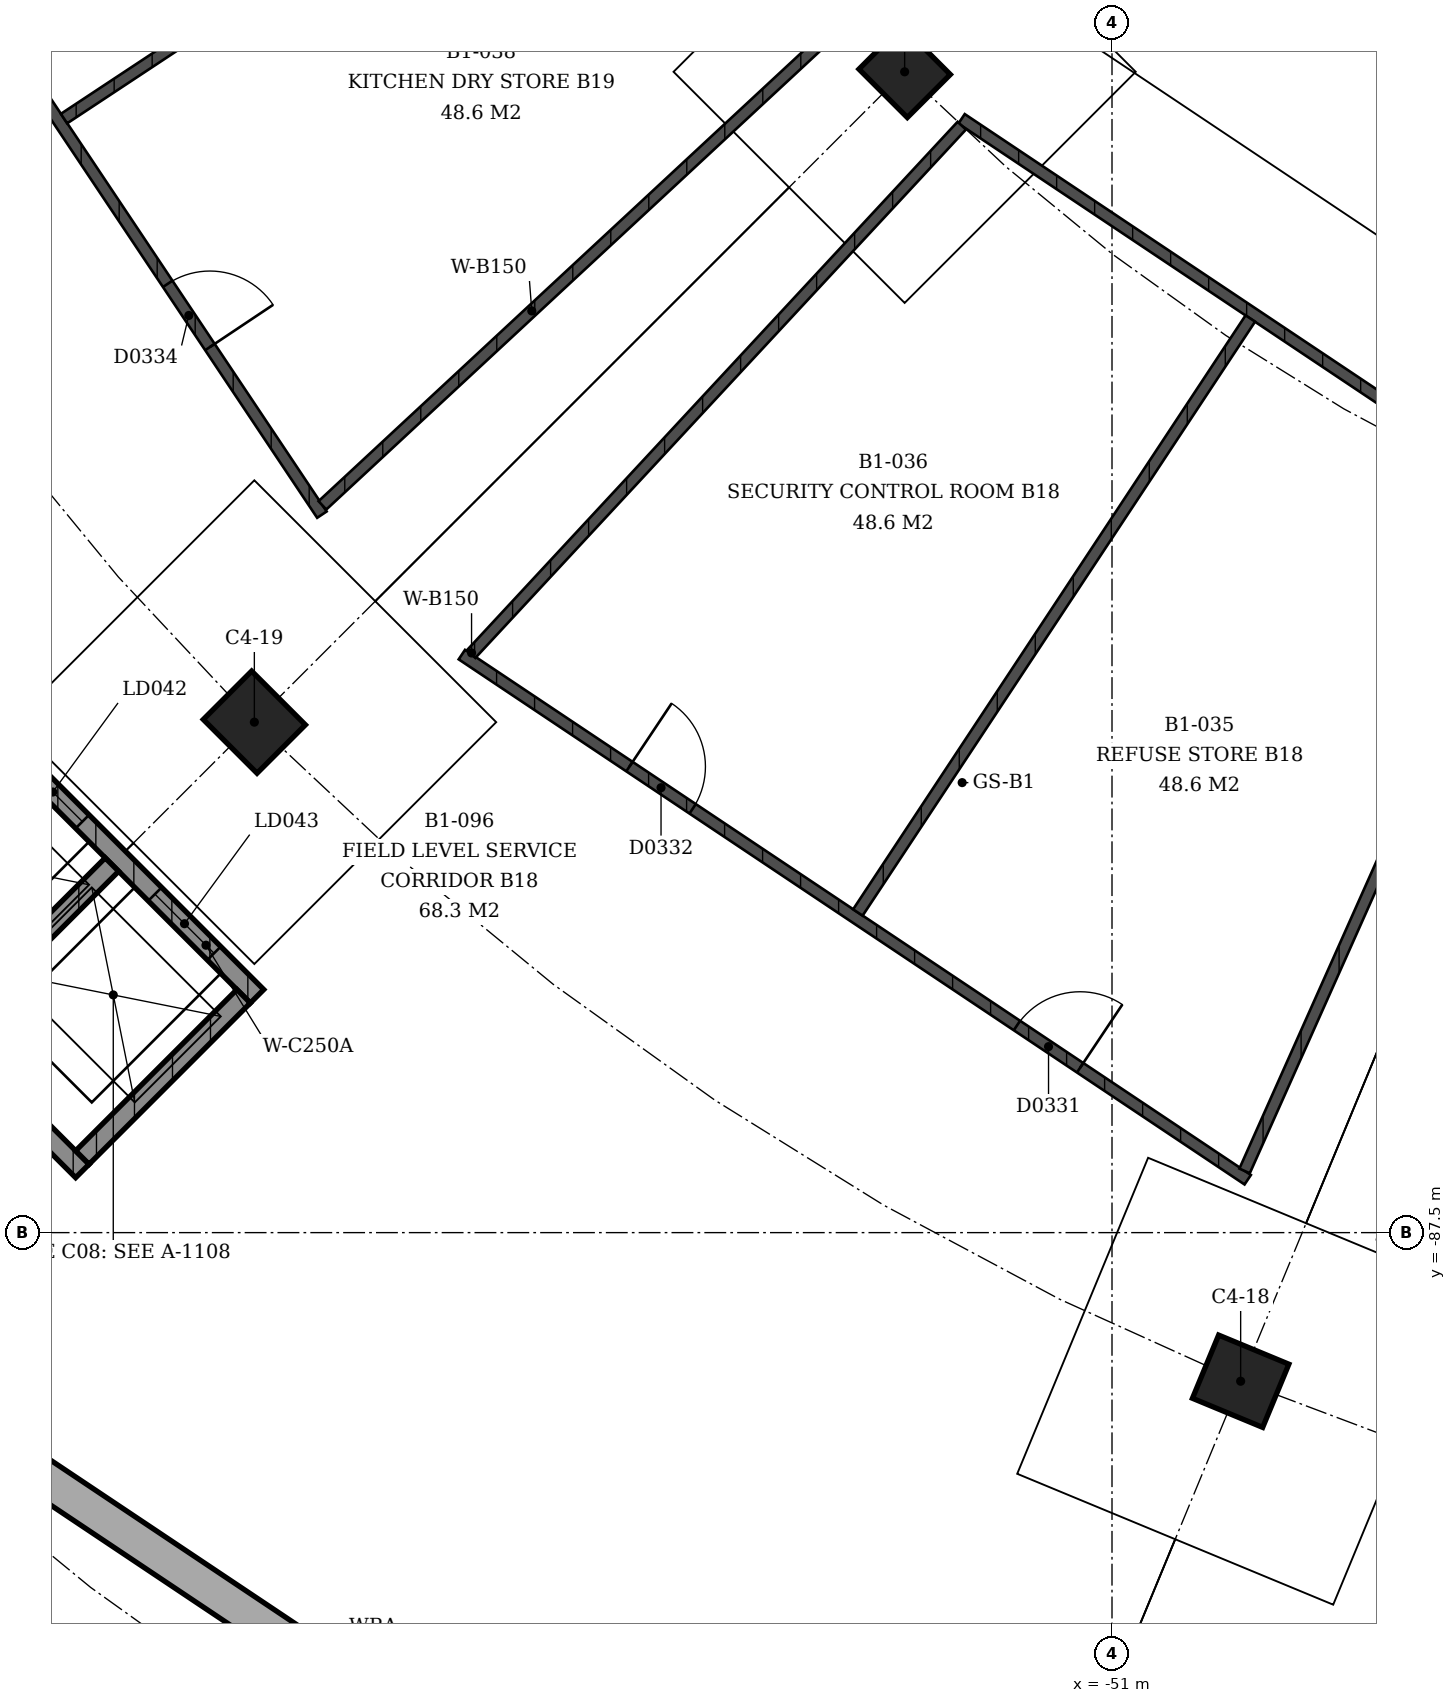
"""IFC4 building model, lengths in metres.
Left out: names, types, materials, properties, quantities, classifications, styles, units other than length and angle.
Written with IfcOpenShell. Run it as: python <this file> out.ifc"""

import sys

from ifc_helpers import new_model, si_unit, direction, frame, frame_2d, origin, origin_2d, place, context, subcontext, project, spatial, polyline, rectangle, outline, extrude, element, fill, save


model = new_model("IFC4")
c1 = context("Model", 3, precision=1e-05, world=origin(), true_north=direction((0.0, 1.0)))
c2 = subcontext(c1, "Body", "Model", "MODEL_VIEW")
j1 = project(units=[si_unit("LENGTHUNIT", "METRE"), si_unit("PLANEANGLEUNIT", "RADIAN")], contexts=[c1])
p1 = place(None, origin())
s1 = spatial("IfcSite", under=j1, at=p1, CompositionType="ELEMENT")
p2 = place(p1, origin())
s2 = spatial("IfcBuilding", under=s1, at=p2, CompositionType="ELEMENT")
p3 = place(p2, frame((0.0, 0.0, -4.5)))
s3 = spatial("IfcBuildingStorey", under=s2, at=p3, CompositionType="ELEMENT", Elevation=-4.5)
p4 = place(p3, frame((-49.307, -89.455, 0.0), z_axis=(0.0, 0.0, 1.0), x_axis=(0.923879532511, -0.382683432365, 0.0)))
e1 = element("IfcColumn", 1, at=p4, inside=s3, PredefinedType="COLUMN", context=c2, shape_type="SweptSolid", body=[
    extrude(rectangle(XDim=1.0, YDim=0.9, at=origin_2d()), origin(), (0.0, 0.0, 1.0), 4.5),
])
p5 = place(p3, frame((-53.728, -72.228, 0.0), z_axis=(0.0, 0.0, 1.0), x_axis=(0.707106781187, -0.707106781187, 0.0)))
e2 = element("IfcColumn", 2, at=p5, inside=s3, PredefinedType="COLUMN", context=c2, shape_type="SweptSolid", body=[
    extrude(rectangle(XDim=0.9, YDim=0.8, at=origin_2d()), origin(), (0.0, 0.0, 1.0), 4.5),
])
p6 = place(p3, frame((-62.284, -80.784, 0.0), z_axis=(0.0, 0.0, 1.0), x_axis=(0.707106781187, -0.707106781187, 0.0)))
e3 = element("IfcColumn", 3, at=p6, inside=s3, PredefinedType="COLUMN", context=c2, shape_type="SweptSolid", body=[
    extrude(rectangle(XDim=1.0, YDim=0.9, at=origin_2d()), origin(), (0.0, 0.0, 1.0), 4.5),
])
p7 = place(p3, frame((0.0, 0.0, -0.4)))
e4 = element("IfcWall", 4, at=p7, inside=s3, PredefinedType="SOLIDWALL", context=c2, shape_type="SweptSolid", body=[
    extrude(outline(polyline([(-68.712, -87.99), (-69.066, -88.344), (-53.696, -98.613), (-53.505, -98.151), (-68.712, -87.99)])), origin(), (0.0, 0.0, 1.0), 3.19),
])
p8 = place(p3, frame((-65.891, -80.749, -1.2), z_axis=(0.0, 0.0, 1.0), x_axis=(0.707106781187, -0.707106781187, 0.0)))
e5 = element("IfcWall", 5, at=p8, inside=s3, PredefinedType="SHEAR", context=c2, shape_type="SweptSolid", body=[
    extrude(rectangle(XDim=5.15, YDim=0.25, at=frame_2d((2.575, 0.0))), origin(), (0.0, 0.0, 1.0), 5.29),
])
p9 = place(p8, frame((0.8, 0.0, 1.2)))
e6 = element("IfcOpeningElement", 6, at=p9, cuts=e5, PredefinedType="OPENING", context=c2, shape_type="SweptSolid", body=[
    extrude(rectangle(XDim=1.1, YDim=2.1, at=frame_2d((0.55, 1.05))), frame((0.0, 0.125, 0.0), z_axis=(0.0, -1.0, 0.0), x_axis=(1.0, 0.0, 0.0)), (0.0, 0.0, 1.0), 0.25),
])
p10 = place(p8, frame((3.25, 0.0, 1.2)))
e7 = element("IfcOpeningElement", 7, at=p10, cuts=e5, PredefinedType="OPENING", context=c2, shape_type="SweptSolid", body=[
    extrude(rectangle(XDim=1.1, YDim=2.1, at=frame_2d((0.55, 1.05))), frame((0.0, 0.125, 0.0), z_axis=(0.0, -1.0, 0.0), x_axis=(1.0, 0.0, 0.0)), (0.0, 0.0, 1.0), 0.25),
])
p11 = place(p3, frame((-68.189, -83.047, -1.2), z_axis=(0.0, 0.0, 1.0), x_axis=(0.707106781187, -0.707106781187, 0.0)))
e8 = element("IfcWall", 8, at=p11, inside=s3, PredefinedType="SHEAR", context=c2, shape_type="SweptSolid", body=[
    extrude(rectangle(XDim=5.15, YDim=0.25, at=frame_2d((2.575, 0.0))), origin(), (0.0, 0.0, 1.0), 5.29),
])
p12 = place(p3, frame((-62.426, -84.391, -1.2), z_axis=(0.0, 0.0, 1.0), x_axis=(-0.707147472125, -0.707066087907, 0.0)))
e9 = element("IfcWall", 9, at=p12, inside=s3, PredefinedType="SHEAR", context=c2, shape_type="SweptSolid", body=[
    extrude(rectangle(XDim=3.0, YDim=0.25, at=frame_2d((1.5, 0.0))), origin(), (0.0, 0.0, 1.0), 5.29),
])
p13 = place(p3, frame((-64.158, -82.658, -1.2), z_axis=(0.0, 0.0, 1.0), x_axis=(-0.707106781187, -0.707106781187, 0.0)))
e10 = element("IfcWall", 10, at=p13, inside=s3, PredefinedType="SHEAR", context=c2, shape_type="SweptSolid", body=[
    extrude(rectangle(XDim=3.0, YDim=0.25, at=frame_2d((1.5, 0.0))), origin(), (0.0, 0.0, 1.0), 5.29),
])
p14 = place(p3, frame((-45.097, -78.114, 0.0), z_axis=(0.0, 0.0, 1.0), x_axis=(-0.831463470141, 0.555579425305, 0.0)))
e11 = element("IfcWall", 11, at=p14, inside=s3, PredefinedType="SOLIDWALL", context=c2, shape_type="SweptSolid", body=[
    extrude(rectangle(XDim=9.48, YDim=0.15, at=frame_2d((4.74, 0.0))), origin(), (0.0, 0.0, 1.0), 3.0),
])
p15 = place(p3, frame((-49.214, -86.804, 0.0), z_axis=(0.0, 0.0, 1.0), x_axis=(-0.831475975747, 0.555560709334, 0.0)))
e12 = element("IfcWall", 12, at=p15, inside=s3, PredefinedType="SOLIDWALL", context=c2, shape_type="SweptSolid", body=[
    extrude(rectangle(XDim=12.436, YDim=0.15, at=frame_2d((6.218, 0.0))), origin(), (0.0, 0.0, 1.0), 3.0),
])
p16 = place(p15, frame((2.652, 0.0, 0.0)))
e13 = element("IfcOpeningElement", 13, at=p16, cuts=e12, PredefinedType="OPENING", context=c2, shape_type="SweptSolid", body=[
    extrude(rectangle(XDim=1.0, YDim=2.1, at=frame_2d((0.5, 1.05))), frame((0.0, 0.075, 0.0), z_axis=(0.0, -1.0, 0.0), x_axis=(1.0, 0.0, 0.0)), (0.0, 0.0, 1.0), 0.15),
])
p17 = place(p15, frame((8.784, 0.0, 0.0)))
e14 = element("IfcOpeningElement", 14, at=p17, cuts=e12, PredefinedType="OPENING", context=c2, shape_type="SweptSolid", body=[
    extrude(rectangle(XDim=1.0, YDim=2.1, at=frame_2d((0.5, 1.05))), frame((0.0, 0.075, 0.0), z_axis=(0.0, -1.0, 0.0), x_axis=(1.0, 0.0, 0.0)), (0.0, 0.0, 1.0), 0.15),
])
p18 = place(p3, frame((-45.383, -78.01, 0.0), z_axis=(0.0, 0.0, 1.0), x_axis=(-0.407503936666, -0.913203450279, 0.0)))
e15 = element("IfcWall", 15, at=p18, inside=s3, PredefinedType="SOLIDWALL", context=c2, shape_type="SweptSolid", body=[
    extrude(rectangle(XDim=9.502, YDim=0.15, at=frame_2d((4.751, 0.0))), origin(), (0.0, 0.0, 1.0), 3.0),
])
p19 = place(p3, frame((-49.18, -75.474, 0.0), z_axis=(0.0, 0.0, 1.0), x_axis=(-0.551278973714, -0.834320977287, 0.0)))
e16 = element("IfcWall", 16, at=p19, inside=s3, PredefinedType="SOLIDWALL", context=c2, shape_type="SweptSolid", body=[
    extrude(rectangle(XDim=9.366, YDim=0.15, at=frame_2d((4.683, 0.0))), origin(), (0.0, 0.0, 1.0), 3.0),
])
p20 = place(p3, frame((-52.977, -72.937, 0.0), z_axis=(0.0, 0.0, 1.0), x_axis=(-0.680436292727, -0.732807240371, 0.0)))
e17 = element("IfcWall", 17, at=p20, inside=s3, PredefinedType="SOLIDWALL", context=c2, shape_type="SweptSolid", body=[
    extrude(rectangle(XDim=9.487, YDim=0.15, at=frame_2d((4.743, 0.0))), origin(), (0.0, 0.0, 1.0), 3.0),
])
p21 = place(p3, frame((-68.304, -67.714, 0.0), z_axis=(0.0, 0.0, 1.0), x_axis=(0.555560709334, -0.831475975747, 0.0)))
e18 = element("IfcWall", 18, at=p21, inside=s3, PredefinedType="SOLIDWALL", context=c2, shape_type="SweptSolid", body=[
    extrude(rectangle(XDim=12.436, YDim=0.15, at=frame_2d((6.218, 0.0))), origin(), (0.0, 0.0, 1.0), 3.0),
])
p22 = place(p21, frame((2.652, 0.0, 0.0)))
e19 = element("IfcOpeningElement", 19, at=p22, cuts=e18, PredefinedType="OPENING", context=c2, shape_type="SweptSolid", body=[
    extrude(rectangle(XDim=1.0, YDim=2.1, at=frame_2d((0.5, 1.05))), frame((0.0, 0.075, 0.0), z_axis=(0.0, -1.0, 0.0), x_axis=(1.0, 0.0, 0.0)), (0.0, 0.0, 1.0), 0.15),
])
p23 = place(p21, frame((8.784, 0.0, 0.0)))
e20 = element("IfcOpeningElement", 20, at=p23, cuts=e18, PredefinedType="OPENING", context=c2, shape_type="SweptSolid", body=[
    extrude(rectangle(XDim=1.0, YDim=2.1, at=frame_2d((0.5, 1.05))), frame((0.0, 0.075, 0.0), z_axis=(0.0, -1.0, 0.0), x_axis=(1.0, 0.0, 0.0)), (0.0, 0.0, 1.0), 0.15),
])
p24 = place(p3, frame((-56.974, -67.68, 0.0), z_axis=(0.0, 0.0, 1.0), x_axis=(-0.834320977287, -0.551278973714, 0.0)))
e21 = element("IfcWall", 21, at=p24, inside=s3, PredefinedType="SOLIDWALL", context=c2, shape_type="SweptSolid", body=[
    extrude(rectangle(XDim=9.366, YDim=0.15, at=frame_2d((4.683, 0.0))), origin(), (0.0, 0.0, 1.0), 3.0),
])
p25 = place(p3, frame((-54.437, -71.477, 0.0), z_axis=(0.0, 0.0, 1.0), x_axis=(-0.732807240371, -0.680436292727, 0.0)))
e22 = element("IfcWall", 22, at=p25, inside=s3, PredefinedType="SOLIDWALL", context=c2, shape_type="SweptSolid", body=[
    extrude(rectangle(XDim=9.487, YDim=0.15, at=frame_2d((4.743, 0.0))), origin(), (0.0, 0.0, 1.0), 3.0),
])
p26 = place(p9, origin())
e23 = element("IfcDoor", 23, at=p26, inside=s3, OperationType="SLIDING_TO_LEFT", PredefinedType="DOOR", context=c2, shape_type="SweptSolid", body=[
    extrude(rectangle(XDim=1.1, YDim=2.1, at=frame_2d((0.55, 1.05))), frame((0.0, 0.025, 0.0), z_axis=(0.0, -1.0, 0.0), x_axis=(1.0, 0.0, 0.0)), (0.0, 0.0, 1.0), 0.05),
])
fill(e6, e23)
p27 = place(p10, origin())
e24 = element("IfcDoor", 24, at=p27, inside=s3, OperationType="SLIDING_TO_LEFT", PredefinedType="DOOR", context=c2, shape_type="SweptSolid", body=[
    extrude(rectangle(XDim=1.1, YDim=2.1, at=frame_2d((0.55, 1.05))), frame((0.0, 0.025, 0.0), z_axis=(0.0, -1.0, 0.0), x_axis=(1.0, 0.0, 0.0)), (0.0, 0.0, 1.0), 0.05),
])
fill(e7, e24)
p28 = place(p16, origin())
e25 = element("IfcDoor", 25, at=p28, inside=s3, OperationType="SINGLE_SWING_LEFT", PredefinedType="DOOR", context=c2, shape_type="SweptSolid", body=[
    extrude(rectangle(XDim=1.0, YDim=2.1, at=frame_2d((0.5, 1.05))), frame((0.0, 0.025, 0.0), z_axis=(0.0, -1.0, 0.0), x_axis=(1.0, 0.0, 0.0)), (0.0, 0.0, 1.0), 0.05),
])
fill(e13, e25)
p29 = place(p17, origin())
e26 = element("IfcDoor", 26, at=p29, inside=s3, OperationType="SINGLE_SWING_RIGHT", PredefinedType="DOOR", context=c2, shape_type="SweptSolid", body=[
    extrude(rectangle(XDim=1.0, YDim=2.1, at=frame_2d((0.5, 1.05))), frame((0.0, 0.025, 0.0), z_axis=(0.0, -1.0, 0.0), x_axis=(1.0, 0.0, 0.0)), (0.0, 0.0, 1.0), 0.05),
])
fill(e14, e26)
p30 = place(p23, origin())
e27 = element("IfcDoor", 27, at=p30, inside=s3, OperationType="SINGLE_SWING_LEFT", PredefinedType="DOOR", context=c2, shape_type="SweptSolid", body=[
    extrude(rectangle(XDim=1.0, YDim=2.1, at=frame_2d((0.5, 1.05))), frame((0.0, 0.025, 0.0), z_axis=(0.0, -1.0, 0.0), x_axis=(1.0, 0.0, 0.0)), (0.0, 0.0, 1.0), 0.05),
])
fill(e20, e27)
save(model, sys.argv[1])
